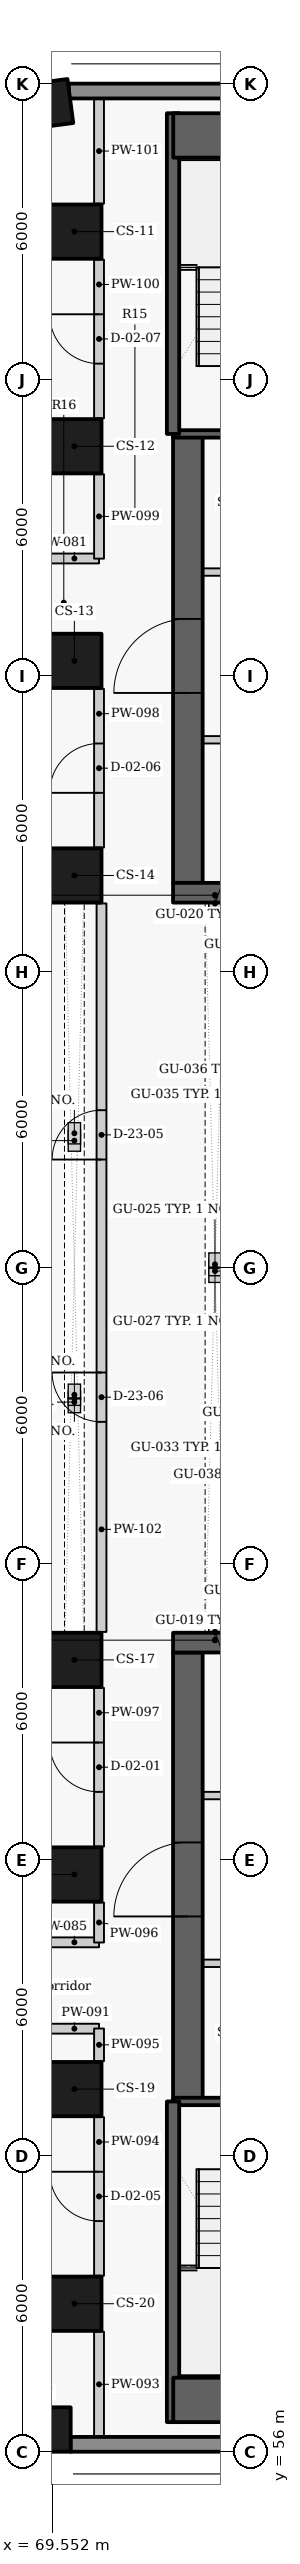
"""IFC4 building model, lengths in metres.
Left out: names, types, materials, properties, quantities, classifications, styles, units other than length and angle.
Written with IfcOpenShell. Run it as: python <this file> out.ifc"""

import sys

from ifc_helpers import new_model, si_unit, direction, frame, frame_2d, origin, origin_2d, place, context, subcontext, project, spatial, rectangle, extrude, element, fill, save


model = new_model("IFC4")
c1 = context("Model", 3, precision=1e-05, world=origin(), true_north=direction((0.0, 1.0)))
c2 = subcontext(c1, "Body", "Model", "MODEL_VIEW")
j1 = project(units=[si_unit("LENGTHUNIT", "METRE"), si_unit("PLANEANGLEUNIT", "RADIAN")], contexts=[c1])
p1 = place(None, origin())
s1 = spatial("IfcSite", under=j1, at=p1, CompositionType="ELEMENT")
p2 = place(p1, origin())
s2 = spatial("IfcBuilding", under=s1, at=p2, CompositionType="ELEMENT")
p3 = place(p2, frame((0.0, 0.0, 38.1)))
s3 = spatial("IfcBuildingStorey", under=s2, at=p3, CompositionType="ELEMENT", Elevation=38.1)
for number, where, z_axis, x_axis in (
    (1, (69.175, 103.55, 0.0), (0.0, 0.0, 1.0), (-0.991, -0.131, 0.0)),
    (2, (69.175, 56.45, 0.0), (0.0, 0.0, 1.0), (1.0, 0.0, 0.0)),
):
    element("IfcColumn", number, at=place(p3, frame(where, z_axis=z_axis, x_axis=x_axis)), inside=s3, PredefinedType="COLUMN", context=c2, shape_type="SweptSolid", body=[
        extrude(rectangle(XDim=1.5, YDim=0.9, at=origin_2d()), origin(), (0.0, 0.0, 1.0), 3.3),
    ])
for number, where, z_axis, x_axis in (
    (3, (70.0, 101.0, 0.0), (0.0, 0.0, 1.0), (0.0, -1.0, 0.0)),
    (4, (70.0, 96.65, 0.0), (0.0, 0.0, 1.0), (0.0, -1.0, 0.0)),
    (5, (70.0, 92.3, 0.0), (0.0, 0.0, 1.0), (0.0, -1.0, 0.0)),
    (6, (70.0, 87.95, 0.0), (0.0, 0.0, 1.0), (0.0, -1.0, 0.0)),
    (7, (70.0, 72.05, 0.0), (0.0, 0.0, 1.0), (0.0, -1.0, 0.0)),
    (8, (70.0, 67.7, 0.0), (0.0, 0.0, 1.0), (0.0, -1.0, 0.0)),
    (9, (70.0, 63.35, 0.0), (0.0, 0.0, 1.0), (0.0, -1.0, 0.0)),
    (10, (70.0, 59.0, 0.0), (0.0, 0.0, 1.0), (0.0, -1.0, 0.0)),
):
    element("IfcColumn", number, at=place(p3, frame(where, z_axis=z_axis, x_axis=x_axis)), inside=s3, PredefinedType="COLUMN", context=c2, shape_type="SweptSolid", body=[
        extrude(rectangle(XDim=1.1, YDim=1.1, at=origin_2d()), origin(), (0.0, 0.0, 1.0), 3.3),
    ])
p4 = place(p3, frame((90.079, 103.85, 0.0), z_axis=(0.0, 0.0, 1.0), x_axis=(-1.0, 0.0, 0.0)))
e11 = element("IfcWall", 11, at=p4, inside=s3, PredefinedType="SOLIDWALL", context=c2, shape_type="SweptSolid", body=[
    extrude(rectangle(XDim=20.19, YDim=0.3, at=frame_2d((10.095, 0.0))), origin(), (0.0, 0.0, 1.0), 2.425),
])
p5 = place(p3, frame((69.921, 56.15, 0.0), z_axis=(0.0, 0.0, 1.0), x_axis=(1.0, 0.0, 0.0)))
e12 = element("IfcWall", 12, at=p5, inside=s3, PredefinedType="SOLIDWALL", context=c2, shape_type="SweptSolid", body=[
    extrude(rectangle(XDim=19.84, YDim=0.3, at=frame_2d((9.92, 0.0))), origin(), (0.0, 0.0, 1.0), 2.425),
])
p6 = place(p3, frame((74.6, 90.7, 0.0), z_axis=(0.0, 0.0, 1.0), x_axis=(-1.0, 0.0, 0.0)))
e13 = element("IfcWall", 13, at=p6, inside=s3, PredefinedType="PARTITIONING", context=c2, shape_type="SweptSolid", body=[
    extrude(rectangle(XDim=2.6, YDim=0.15, at=frame_2d((1.3, 0.0))), origin(), (0.0, 0.0, 1.0), 3.025),
])
p7 = place(p6, frame((0.525, 0.0, 0.0)))
e14 = element("IfcOpeningElement", 14, at=p7, cuts=e13, PredefinedType="OPENING", context=c2, shape_type="SweptSolid", body=[
    extrude(rectangle(XDim=0.9, YDim=2.1, at=frame_2d((0.45, 1.05))), frame((0.0, 0.085, 0.0), z_axis=(0.0, -1.0, 0.0), x_axis=(1.0, 0.0, 0.0)), (0.0, 0.0, 1.0), 0.17),
])
p8 = place(p3, frame((72.3, 87.8, -0.4), z_axis=(0.0, 0.0, 1.0), x_axis=(0.0, 1.0, 0.0)))
e15 = element("IfcWall", 15, at=p8, inside=s3, PredefinedType="SHEAR", context=c2, shape_type="SweptSolid", body=[
    extrude(rectangle(XDim=9.1, YDim=0.6, at=frame_2d((4.55, 0.0))), origin(), (0.0, 0.0, 1.0), 3.425),
])
p9 = place(p8, frame((3.85, 0.0, 0.4)))
e16 = element("IfcOpeningElement", 16, at=p9, cuts=e15, PredefinedType="OPENING", context=c2, shape_type="SweptSolid", body=[
    extrude(rectangle(XDim=1.5, YDim=2.1, at=frame_2d((0.75, 1.05))), frame((0.0, 0.31, 0.0), z_axis=(0.0, -1.0, 0.0), x_axis=(1.0, 0.0, 0.0)), (0.0, 0.0, 1.0), 0.62),
])
p10 = place(p3, frame((72.0, 94.1, 0.0), z_axis=(0.0, 0.0, 1.0), x_axis=(1.0, 0.0, 0.0)))
e17 = element("IfcWall", 17, at=p10, inside=s3, PredefinedType="PARTITIONING", context=c2, shape_type="SweptSolid", body=[
    extrude(rectangle(XDim=2.603, YDim=0.15, at=frame_2d((1.302, 0.0))), origin(), (0.0, 0.0, 1.0), 3.025),
])
p11 = place(p10, frame((1.075, 0.0, 0.0)))
e18 = element("IfcOpeningElement", 18, at=p11, cuts=e17, PredefinedType="OPENING", context=c2, shape_type="SweptSolid", body=[
    extrude(rectangle(XDim=1.1, YDim=2.1, at=frame_2d((0.55, 1.05))), frame((0.0, 0.085, 0.0), z_axis=(0.0, -1.0, 0.0), x_axis=(1.0, 0.0, 0.0)), (0.0, 0.0, 1.0), 0.17),
])
p12 = place(p3, frame((74.6, 96.9, -0.4), z_axis=(0.0, 0.0, 1.0), x_axis=(-1.0, 0.0, 0.0)))
e19 = element("IfcWall", 19, at=p12, inside=s3, PredefinedType="SHEAR", context=c2, shape_type="SweptSolid", body=[
    extrude(rectangle(XDim=2.6, YDim=0.15, at=frame_2d((1.3, 0.0))), origin(), (0.0, 0.0, 1.0), 3.425),
])
p13 = place(p12, frame((0.37, 0.0, 0.4)))
e20 = element("IfcOpeningElement", 20, at=p13, cuts=e19, PredefinedType="OPENING", context=c2, shape_type="SweptSolid", body=[
    extrude(rectangle(XDim=1.1, YDim=2.1, at=frame_2d((0.55, 1.05))), frame((0.0, 0.085, 0.0), z_axis=(0.0, -1.0, 0.0), x_axis=(1.0, 0.0, 0.0)), (0.0, 0.0, 1.0), 0.17),
])
p14 = place(p3, frame((72.0, 96.9, -0.4), z_axis=(0.0, 0.0, 1.0), x_axis=(0.0, 1.0, 0.0)))
e21 = element("IfcWall", 21, at=p14, inside=s3, PredefinedType="SHEAR", context=c2, shape_type="SweptSolid", body=[
    extrude(rectangle(XDim=6.5, YDim=0.25, at=frame_2d((3.25, 0.0))), origin(), (0.0, 0.0, 1.0), 3.425),
])
p15 = place(p3, frame((72.0, 69.3, 0.0), z_axis=(0.0, 0.0, 1.0), x_axis=(1.0, 0.0, 0.0)))
e22 = element("IfcWall", 22, at=p15, inside=s3, PredefinedType="PARTITIONING", context=c2, shape_type="SweptSolid", body=[
    extrude(rectangle(XDim=2.6, YDim=0.15, at=frame_2d((1.3, 0.0))), origin(), (0.0, 0.0, 1.0), 3.025),
])
p16 = place(p15, frame((1.175, 0.0, 0.0)))
e23 = element("IfcOpeningElement", 23, at=p16, cuts=e22, PredefinedType="OPENING", context=c2, shape_type="SweptSolid", body=[
    extrude(rectangle(XDim=0.9, YDim=2.1, at=frame_2d((0.45, 1.05))), frame((0.0, 0.085, 0.0), z_axis=(0.0, -1.0, 0.0), x_axis=(1.0, 0.0, 0.0)), (0.0, 0.0, 1.0), 0.17),
])
p17 = place(p3, frame((72.3, 63.1, -0.4), z_axis=(0.0, 0.0, 1.0), x_axis=(0.0, 1.0, 0.0)))
e24 = element("IfcWall", 24, at=p17, inside=s3, PredefinedType="SHEAR", context=c2, shape_type="SweptSolid", body=[
    extrude(rectangle(XDim=9.1, YDim=0.6, at=frame_2d((4.55, 0.0))), origin(), (0.0, 0.0, 1.0), 3.425),
])
p18 = place(p17, frame((3.75, 0.0, 0.4)))
e25 = element("IfcOpeningElement", 25, at=p18, cuts=e24, PredefinedType="OPENING", context=c2, shape_type="SweptSolid", body=[
    extrude(rectangle(XDim=1.5, YDim=2.1, at=frame_2d((0.75, 1.05))), frame((0.0, 0.31, 0.0), z_axis=(0.0, -1.0, 0.0), x_axis=(1.0, 0.0, 0.0)), (0.0, 0.0, 1.0), 0.62),
])
p19 = place(p3, frame((74.603, 65.9, 0.0), z_axis=(0.0, 0.0, 1.0), x_axis=(-1.0, 0.0, 0.0)))
e26 = element("IfcWall", 26, at=p19, inside=s3, PredefinedType="PARTITIONING", context=c2, shape_type="SweptSolid", body=[
    extrude(rectangle(XDim=2.603, YDim=0.15, at=frame_2d((1.302, 0.0))), origin(), (0.0, 0.0, 1.0), 3.025),
])
p20 = place(p19, frame((0.428, 0.0, 0.0)))
e27 = element("IfcOpeningElement", 27, at=p20, cuts=e26, PredefinedType="OPENING", context=c2, shape_type="SweptSolid", body=[
    extrude(rectangle(XDim=1.1, YDim=2.1, at=frame_2d((0.55, 1.05))), frame((0.0, 0.085, 0.0), z_axis=(0.0, -1.0, 0.0), x_axis=(1.0, 0.0, 0.0)), (0.0, 0.0, 1.0), 0.17),
])
p21 = place(p3, frame((72.0, 63.1, -0.4), z_axis=(0.0, 0.0, 1.0), x_axis=(1.0, 0.0, 0.0)))
e28 = element("IfcWall", 28, at=p21, inside=s3, PredefinedType="SHEAR", context=c2, shape_type="SweptSolid", body=[
    extrude(rectangle(XDim=2.6, YDim=0.15, at=frame_2d((1.3, 0.0))), origin(), (0.0, 0.0, 1.0), 3.425),
])
p22 = place(p21, frame((1.02, 0.0, 0.4)))
e29 = element("IfcOpeningElement", 29, at=p22, cuts=e28, PredefinedType="OPENING", context=c2, shape_type="SweptSolid", body=[
    extrude(rectangle(XDim=1.1, YDim=2.1, at=frame_2d((0.55, 1.05))), frame((0.0, 0.085, 0.0), z_axis=(0.0, -1.0, 0.0), x_axis=(1.0, 0.0, 0.0)), (0.0, 0.0, 1.0), 0.17),
])
p23 = place(p3, frame((72.0, 56.6, -0.4), z_axis=(0.0, 0.0, 1.0), x_axis=(0.0, 1.0, 0.0)))
e30 = element("IfcWall", 30, at=p23, inside=s3, PredefinedType="SHEAR", context=c2, shape_type="SweptSolid", body=[
    extrude(rectangle(XDim=6.5, YDim=0.25, at=frame_2d((3.25, 0.0))), origin(), (0.0, 0.0, 1.0), 3.425),
])
for number, where, z_axis, x_axis in (
    (31, (69.5, 94.375, 0.0), (0.0, 0.0, 1.0), (1.0, 0.0, 0.0)),
    (32, (69.5, 66.325, 0.0), (0.0, 0.0, 1.0), (1.0, 0.0, 0.0)),
    (33, (69.5, 64.575, 0.0), (0.0, 0.0, 1.0), (1.0, 0.0, 0.0)),
):
    element("IfcWall", number, at=place(p3, frame(where, z_axis=z_axis, x_axis=x_axis)), inside=s3, PredefinedType="PARTITIONING", context=c2, shape_type="SweptSolid", body=[
        extrude(rectangle(XDim=1.0, YDim=0.2, at=frame_2d((0.5, 0.0))), origin(), (0.0, 0.0, 1.0), 2.505),
    ])
p24 = place(p3, frame((70.5, 56.3, 0.0), z_axis=(0.0, 0.0, 1.0), x_axis=(0.0, 1.0, 0.0)))
e34 = element("IfcWall", 34, at=p24, inside=s3, PredefinedType="PARTITIONING", context=c2, shape_type="SweptSolid", body=[
    extrude(rectangle(XDim=2.133, YDim=0.2, at=frame_2d((1.066, 0.0))), origin(), (0.0, 0.0, 1.0), 3.025),
])
p25 = place(p3, frame((70.5, 59.567, 0.0), z_axis=(0.0, 0.0, 1.0), x_axis=(0.0, 1.0, 0.0)))
e35 = element("IfcWall", 35, at=p25, inside=s3, PredefinedType="PARTITIONING", context=c2, shape_type="SweptSolid", body=[
    extrude(rectangle(XDim=3.216, YDim=0.2, at=frame_2d((1.608, 0.0))), origin(), (0.0, 0.0, 1.0), 3.025),
])
p26 = place(p25, frame((1.108, 0.0, 0.0)))
e36 = element("IfcOpeningElement", 36, at=p26, cuts=e35, PredefinedType="OPENING", context=c2, shape_type="SweptSolid", body=[
    extrude(rectangle(XDim=1.0, YDim=2.1, at=frame_2d((0.5, 1.05))), frame((0.0, 0.11, 0.0), z_axis=(0.0, -1.0, 0.0), x_axis=(1.0, 0.0, 0.0)), (0.0, 0.0, 1.0), 0.22),
])
p27 = place(p3, frame((70.5, 63.917, 0.0), z_axis=(0.0, 0.0, 1.0), x_axis=(0.0, 1.0, 0.0)))
e37 = element("IfcWall", 37, at=p27, inside=s3, PredefinedType="PARTITIONING", context=c2, shape_type="SweptSolid", body=[
    extrude(rectangle(XDim=0.661, YDim=0.2, at=frame_2d((0.331, 0.0))), origin(), (0.0, 0.0, 1.0), 3.025),
])
p28 = place(p3, frame((70.5, 66.322, 0.0), z_axis=(0.0, 0.0, 1.0), x_axis=(0.0, 1.0, 0.0)))
e38 = element("IfcWall", 38, at=p28, inside=s3, PredefinedType="PARTITIONING", context=c2, shape_type="SweptSolid", body=[
    extrude(rectangle(XDim=0.811, YDim=0.2, at=frame_2d((0.406, 0.0))), origin(), (0.0, 0.0, 1.0), 3.025),
])
p29 = place(p3, frame((70.5, 68.267, 0.0), z_axis=(0.0, 0.0, 1.0), x_axis=(0.0, 1.0, 0.0)))
e39 = element("IfcWall", 39, at=p29, inside=s3, PredefinedType="PARTITIONING", context=c2, shape_type="SweptSolid", body=[
    extrude(rectangle(XDim=3.216, YDim=0.2, at=frame_2d((1.608, 0.0))), origin(), (0.0, 0.0, 1.0), 3.025),
])
p30 = place(p29, frame((1.108, 0.0, 0.0)))
e40 = element("IfcOpeningElement", 40, at=p30, cuts=e39, PredefinedType="OPENING", context=c2, shape_type="SweptSolid", body=[
    extrude(rectangle(XDim=1.0, YDim=2.1, at=frame_2d((0.5, 1.05))), frame((0.0, 0.11, 0.0), z_axis=(0.0, -1.0, 0.0), x_axis=(1.0, 0.0, 0.0)), (0.0, 0.0, 1.0), 0.22),
])
p31 = place(p3, frame((70.5, 88.517, 0.0), z_axis=(0.0, 0.0, 1.0), x_axis=(0.0, 1.0, 0.0)))
e41 = element("IfcWall", 41, at=p31, inside=s3, PredefinedType="PARTITIONING", context=c2, shape_type="SweptSolid", body=[
    extrude(rectangle(XDim=3.216, YDim=0.2, at=frame_2d((1.608, 0.0))), origin(), (0.0, 0.0, 1.0), 3.025),
])
p32 = place(p31, frame((1.108, 0.0, 0.0)))
e42 = element("IfcOpeningElement", 42, at=p32, cuts=e41, PredefinedType="OPENING", context=c2, shape_type="SweptSolid", body=[
    extrude(rectangle(XDim=1.0, YDim=2.1, at=frame_2d((0.5, 1.05))), frame((0.0, 0.11, 0.0), z_axis=(0.0, -1.0, 0.0), x_axis=(1.0, 0.0, 0.0)), (0.0, 0.0, 1.0), 0.22),
])
p33 = place(p3, frame((70.5, 94.372, 0.0), z_axis=(0.0, 0.0, 1.0), x_axis=(0.0, 1.0, 0.0)))
e43 = element("IfcWall", 43, at=p33, inside=s3, PredefinedType="PARTITIONING", context=c2, shape_type="SweptSolid", body=[
    extrude(rectangle(XDim=1.711, YDim=0.2, at=frame_2d((0.855, 0.0))), origin(), (0.0, 0.0, 1.0), 3.025),
])
p34 = place(p3, frame((70.5, 97.217, 0.0), z_axis=(0.0, 0.0, 1.0), x_axis=(0.0, 1.0, 0.0)))
e44 = element("IfcWall", 44, at=p34, inside=s3, PredefinedType="PARTITIONING", context=c2, shape_type="SweptSolid", body=[
    extrude(rectangle(XDim=3.216, YDim=0.2, at=frame_2d((1.608, 0.0))), origin(), (0.0, 0.0, 1.0), 3.025),
])
p35 = place(p34, frame((1.108, 0.0, 0.0)))
e45 = element("IfcOpeningElement", 45, at=p35, cuts=e44, PredefinedType="OPENING", context=c2, shape_type="SweptSolid", body=[
    extrude(rectangle(XDim=1.0, YDim=2.1, at=frame_2d((0.5, 1.05))), frame((0.0, 0.11, 0.0), z_axis=(0.0, -1.0, 0.0), x_axis=(1.0, 0.0, 0.0)), (0.0, 0.0, 1.0), 0.22),
])
p36 = place(p3, frame((70.5, 101.567, 0.0), z_axis=(0.0, 0.0, 1.0), x_axis=(0.0, 1.0, 0.0)))
e46 = element("IfcWall", 46, at=p36, inside=s3, PredefinedType="PARTITIONING", context=c2, shape_type="SweptSolid", body=[
    extrude(rectangle(XDim=2.133, YDim=0.2, at=frame_2d((1.066, 0.0))), origin(), (0.0, 0.0, 1.0), 3.025),
])
p37 = place(p3, frame((70.55, 72.617, 0.0), z_axis=(0.0, 0.0, 1.0), x_axis=(0.0, 1.0, 0.0)))
e47 = element("IfcWall", 47, at=p37, inside=s3, PredefinedType="PARTITIONING", context=c2, shape_type="SweptSolid", body=[
    extrude(rectangle(XDim=14.766, YDim=0.2, at=frame_2d((7.383, 0.0))), origin(), (0.0, 0.0, 1.0), 3.025),
])
p38 = place(p37, frame((9.575, 0.0, 0.0)))
e48 = element("IfcOpeningElement", 48, at=p38, cuts=e47, PredefinedType="OPENING", context=c2, shape_type="SweptSolid", body=[
    extrude(rectangle(XDim=1.0, YDim=2.1, at=frame_2d((0.5, 1.05))), frame((0.0, 0.11, 0.0), z_axis=(0.0, -1.0, 0.0), x_axis=(1.0, 0.0, 0.0)), (0.0, 0.0, 1.0), 0.22),
])
p39 = place(p37, frame((4.258, 0.0, 0.0)))
e49 = element("IfcOpeningElement", 49, at=p39, cuts=e47, PredefinedType="OPENING", context=c2, shape_type="SweptSolid", body=[
    extrude(rectangle(XDim=1.0, YDim=2.1, at=frame_2d((0.5, 1.05))), frame((0.0, 0.11, 0.0), z_axis=(0.0, -1.0, 0.0), x_axis=(1.0, 0.0, 0.0)), (0.0, 0.0, 1.0), 0.22),
])
p40 = place(p3, frame((72.0, 87.6, -0.4), z_axis=(0.0, 0.0, 1.0), x_axis=(1.0, 0.0, 0.0)))
e50 = element("IfcWall", 50, at=p40, inside=s3, PredefinedType="SHEAR", context=c2, shape_type="SweptSolid", body=[
    extrude(rectangle(XDim=16.0, YDim=0.4, at=frame_2d((8.0, 0.0))), origin(), (0.0, 0.0, 1.0), 3.425),
])
p41 = place(p3, frame((72.004, 102.95, -0.4), z_axis=(0.0, 0.0, 1.0), x_axis=(1.0, 0.0, 0.0)))
e51 = element("IfcWall", 51, at=p41, inside=s3, PredefinedType="SHEAR", context=c2, shape_type="SweptSolid", body=[
    extrude(rectangle(XDim=15.992, YDim=0.9, at=frame_2d((7.996, 0.0))), origin(), (0.0, 0.0, 1.0), 3.425),
])
p42 = place(p3, frame((72.0, 72.4, -0.4), z_axis=(0.0, 0.0, 1.0), x_axis=(1.0, 0.0, 0.0)))
e52 = element("IfcWall", 52, at=p42, inside=s3, PredefinedType="SHEAR", context=c2, shape_type="SweptSolid", body=[
    extrude(rectangle(XDim=16.0, YDim=0.4, at=frame_2d((8.0, 0.0))), origin(), (0.0, 0.0, 1.0), 3.425),
])
p43 = place(p3, frame((72.004, 57.05, -0.4), z_axis=(0.0, 0.0, 1.0), x_axis=(1.0, 0.0, 0.0)))
e53 = element("IfcWall", 53, at=p43, inside=s3, PredefinedType="SHEAR", context=c2, shape_type="SweptSolid", body=[
    extrude(rectangle(XDim=15.992, YDim=0.9, at=frame_2d((7.996, 0.0))), origin(), (0.0, 0.0, 1.0), 3.425),
])
p44 = place(p30, origin())
e54 = element("IfcDoor", 54, at=p44, inside=s3, OperationType="SINGLE_SWING_RIGHT", PredefinedType="DOOR", context=c2, shape_type="SweptSolid", body=[
    extrude(rectangle(XDim=1.0, YDim=2.1, at=frame_2d((0.5, 1.05))), frame((0.0, 0.025, 0.0), z_axis=(0.0, -1.0, 0.0), x_axis=(1.0, 0.0, 0.0)), (0.0, 0.0, 1.0), 0.05),
])
fill(e40, e54)
p45 = place(p26, origin())
e55 = element("IfcDoor", 55, at=p45, inside=s3, OperationType="SINGLE_SWING_RIGHT", PredefinedType="DOOR", context=c2, shape_type="SweptSolid", body=[
    extrude(rectangle(XDim=1.0, YDim=2.1, at=frame_2d((0.5, 1.05))), frame((0.0, 0.025, 0.0), z_axis=(0.0, -1.0, 0.0), x_axis=(1.0, 0.0, 0.0)), (0.0, 0.0, 1.0), 0.05),
])
fill(e36, e55)
p46 = place(p32, origin())
e56 = element("IfcDoor", 56, at=p46, inside=s3, OperationType="SINGLE_SWING_LEFT", PredefinedType="DOOR", context=c2, shape_type="SweptSolid", body=[
    extrude(rectangle(XDim=1.0, YDim=2.1, at=frame_2d((0.5, 1.05))), frame((0.0, 0.025, 0.0), z_axis=(0.0, -1.0, 0.0), x_axis=(1.0, 0.0, 0.0)), (0.0, 0.0, 1.0), 0.05),
])
fill(e42, e56)
p47 = place(p35, origin())
e57 = element("IfcDoor", 57, at=p47, inside=s3, OperationType="SINGLE_SWING_RIGHT", PredefinedType="DOOR", context=c2, shape_type="SweptSolid", body=[
    extrude(rectangle(XDim=1.0, YDim=2.1, at=frame_2d((0.5, 1.05))), frame((0.0, 0.025, 0.0), z_axis=(0.0, -1.0, 0.0), x_axis=(1.0, 0.0, 0.0)), (0.0, 0.0, 1.0), 0.05),
])
fill(e45, e57)
p48 = place(p38, origin())
e58 = element("IfcDoor", 58, at=p48, inside=s3, OperationType="SINGLE_SWING_LEFT", PredefinedType="DOOR", context=c2, shape_type="SweptSolid", body=[
    extrude(rectangle(XDim=1.0, YDim=2.1, at=frame_2d((0.5, 1.05))), frame((0.0, 0.025, 0.0), z_axis=(0.0, -1.0, 0.0), x_axis=(1.0, 0.0, 0.0)), (0.0, 0.0, 1.0), 0.05),
])
fill(e48, e58)
p49 = place(p39, origin())
e59 = element("IfcDoor", 59, at=p49, inside=s3, OperationType="SINGLE_SWING_RIGHT", PredefinedType="DOOR", context=c2, shape_type="SweptSolid", body=[
    extrude(rectangle(XDim=1.0, YDim=2.1, at=frame_2d((0.5, 1.05))), frame((0.0, 0.025, 0.0), z_axis=(0.0, -1.0, 0.0), x_axis=(1.0, 0.0, 0.0)), (0.0, 0.0, 1.0), 0.05),
])
fill(e49, e59)
p50 = place(p9, origin())
e60 = element("IfcDoor", 60, at=p50, inside=s3, OperationType="DOUBLE_DOOR_SINGLE_SWING", PredefinedType="DOOR", context=c2, shape_type="SweptSolid", body=[
    extrude(rectangle(XDim=1.5, YDim=2.1, at=frame_2d((0.75, 1.05))), frame((0.0, 0.025, 0.0), z_axis=(0.0, -1.0, 0.0), x_axis=(1.0, 0.0, 0.0)), (0.0, 0.0, 1.0), 0.05),
])
fill(e16, e60)
p51 = place(p18, origin())
e61 = element("IfcDoor", 61, at=p51, inside=s3, OperationType="DOUBLE_DOOR_SINGLE_SWING", PredefinedType="DOOR", context=c2, shape_type="SweptSolid", body=[
    extrude(rectangle(XDim=1.5, YDim=2.1, at=frame_2d((0.75, 1.05))), frame((0.0, 0.025, 0.0), z_axis=(0.0, -1.0, 0.0), x_axis=(1.0, 0.0, 0.0)), (0.0, 0.0, 1.0), 0.05),
])
fill(e25, e61)
save(model, sys.argv[1])
